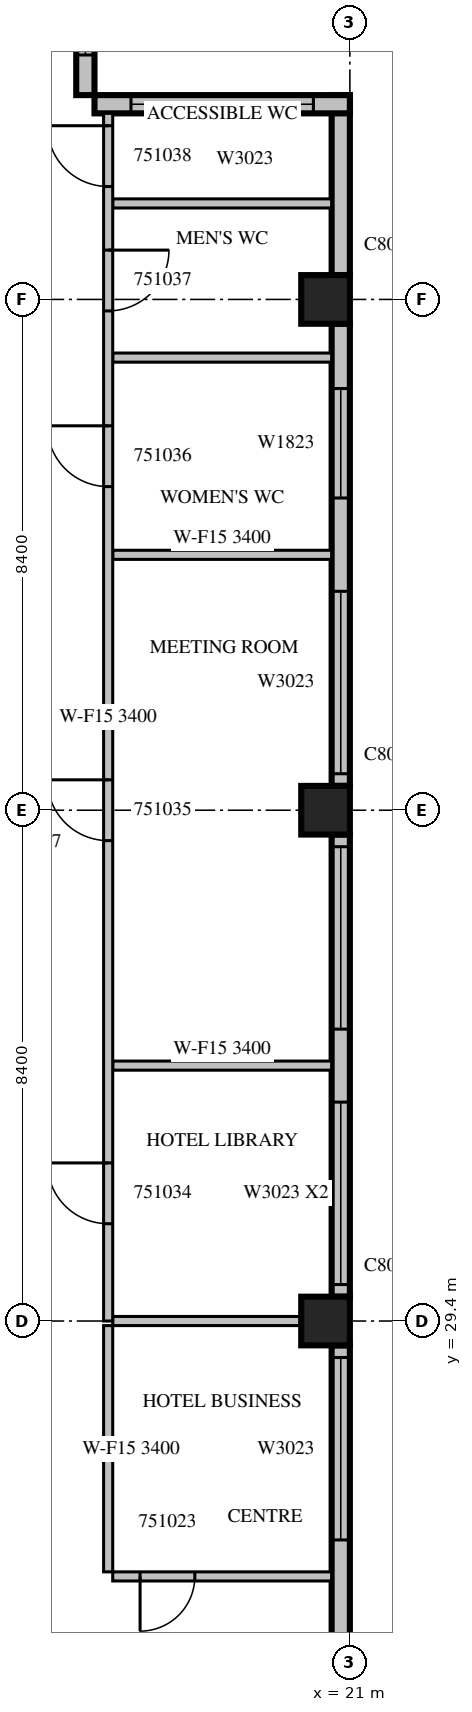
"""IFC4 building model, lengths in metres.
Left out: names, types, materials, properties, quantities, classifications, styles, units other than length and angle.
Written with IfcOpenShell. Run it as: python <this file> out.ifc"""

import sys

from ifc_helpers import new_model, si_unit, direction, frame, frame_2d, origin, origin_2d, place, context, subcontext, project, spatial, rectangle, extrude, source, transform, mapped, element, fill, save


model = new_model("IFC4")
c1 = context("Model", 3, precision=1e-05, world=origin(), true_north=direction((0.0, 1.0)))
c2 = subcontext(c1, "Body", "Model", "MODEL_VIEW")
j1 = project(units=[si_unit("LENGTHUNIT", "METRE"), si_unit("PLANEANGLEUNIT", "RADIAN")], contexts=[c1])
p1 = place(None, origin())
s1 = spatial("IfcSite", under=j1, at=p1, CompositionType="ELEMENT")
p2 = place(p1, origin())
s2 = spatial("IfcBuilding", under=s1, at=p2, CompositionType="ELEMENT")
p3 = place(p2, frame((0.0, 0.0, 227.2)))
s3 = spatial("IfcBuildingStorey", under=s2, at=p3, CompositionType="ELEMENT", Elevation=227.2)
m1 = source(origin(), c2, "Body", "SweptSolid", [
    extrude(rectangle(XDim=0.8, YDim=0.8, at=origin_2d()), origin(), (0.0, 0.0, 1.0), 3.8),
])
for number, where, z_axis, x_axis in (
    (1, (20.6, 29.4, 0.0), (0.0, 0.0, 1.0), (1.0, 0.0, 0.0)),
    (2, (20.6, 37.8, 0.0), (0.0, 0.0, 1.0), (1.0, 0.0, 0.0)),
    (3, (20.6, 46.2, 0.0), (0.0, 0.0, 1.0), (1.0, 0.0, 0.0)),
):
    element("IfcColumn", number, at=place(p3, frame(where, z_axis=z_axis, x_axis=x_axis)), inside=s3, PredefinedType="COLUMN", context=c2, shape_type="MappedRepresentation", body=[
        mapped(m1, transform((0.0, 0.0, 0.0), scale=1.0)),
    ])
m2 = source(origin(), c2, "Body", "SweptSolid", [
    extrude(rectangle(XDim=7.2, YDim=0.3, at=frame_2d((3.6, 0.0))), origin(), (0.0, 0.0, 1.0), 3.4),
])
p4 = place(p3, frame((20.85, 21.8, 0.0), z_axis=(0.0, 0.0, 1.0), x_axis=(0.0, 1.0, 0.0)))
e4 = element("IfcWall", 4, at=p4, inside=s3, PredefinedType="STANDARD", context=c2, shape_type="MappedRepresentation", body=[
    mapped(m2, transform((0.0, 0.0, 0.0), scale=1.0)),
])
m3 = source(origin(), c2, "Body", "SweptSolid", [
    extrude(rectangle(XDim=1.8, YDim=2.3, at=frame_2d((0.9, 1.15))), frame((0.0, 0.16, 0.0), z_axis=(0.0, -1.0, 0.0), x_axis=(1.0, 0.0, 0.0)), (0.0, 0.0, 1.0), 0.32),
])
p5 = place(p4, frame((0.4, 0.0, 0.6)))
e5 = element("IfcOpeningElement", 5, at=p5, cuts=e4, PredefinedType="OPENING", context=c2, shape_type="MappedRepresentation", body=[
    mapped(m3, transform((0.0, 0.0, 0.0), scale=1.0)),
])
m4 = source(origin(), c2, "Body", "SweptSolid", [
    extrude(rectangle(XDim=3.0, YDim=2.3, at=frame_2d((1.5, 1.15))), frame((0.0, 0.16, 0.0), z_axis=(0.0, -1.0, 0.0), x_axis=(1.0, 0.0, 0.0)), (0.0, 0.0, 1.0), 0.32),
])
p6 = place(p4, frame((4.0, 0.0, 0.6)))
e6 = element("IfcOpeningElement", 6, at=p6, cuts=e4, PredefinedType="OPENING", context=c2, shape_type="MappedRepresentation", body=[
    mapped(m4, transform((0.0, 0.0, 0.0), scale=1.0)),
])
m5 = source(origin(), c2, "Body", "SweptSolid", [
    extrude(rectangle(XDim=7.6, YDim=0.3, at=frame_2d((3.8, 0.0))), origin(), (0.0, 0.0, 1.0), 3.4),
])
p7 = place(p3, frame((20.85, 29.8, 0.0), z_axis=(0.0, 0.0, 1.0), x_axis=(0.0, 1.0, 0.0)))
e7 = element("IfcWall", 7, at=p7, inside=s3, PredefinedType="STANDARD", context=c2, shape_type="MappedRepresentation", body=[
    mapped(m5, transform((0.0, 0.0, 0.0), scale=1.0)),
])
p8 = place(p7, frame((0.2, 0.0, 0.6)))
e8 = element("IfcOpeningElement", 8, at=p8, cuts=e7, PredefinedType="OPENING", context=c2, shape_type="MappedRepresentation", body=[
    mapped(m4, transform((0.0, 0.0, 0.0), scale=1.0)),
])
p9 = place(p7, frame((4.4, 0.0, 0.6)))
e9 = element("IfcOpeningElement", 9, at=p9, cuts=e7, PredefinedType="OPENING", context=c2, shape_type="MappedRepresentation", body=[
    mapped(m4, transform((0.0, 0.0, 0.0), scale=1.0)),
])
p10 = place(p3, frame((20.85, 38.2, 0.0), z_axis=(0.0, 0.0, 1.0), x_axis=(0.0, 1.0, 0.0)))
e10 = element("IfcWall", 10, at=p10, inside=s3, PredefinedType="STANDARD", context=c2, shape_type="MappedRepresentation", body=[
    mapped(m5, transform((0.0, 0.0, 0.0), scale=1.0)),
])
p11 = place(p10, frame((0.2, 0.0, 0.6)))
e11 = element("IfcOpeningElement", 11, at=p11, cuts=e10, PredefinedType="OPENING", context=c2, shape_type="MappedRepresentation", body=[
    mapped(m4, transform((0.0, 0.0, 0.0), scale=1.0)),
])
p12 = place(p10, frame((4.734, 0.0, 0.6)))
e12 = element("IfcOpeningElement", 12, at=p12, cuts=e10, PredefinedType="OPENING", context=c2, shape_type="MappedRepresentation", body=[
    mapped(m3, transform((0.0, 0.0, 0.0), scale=1.0)),
])
m6 = source(origin(), c2, "Body", "SweptSolid", [
    extrude(rectangle(XDim=2.96, YDim=0.3, at=frame_2d((1.48, 0.0))), origin(), (0.0, 0.0, 1.0), 3.4),
])
p13 = place(p3, frame((20.85, 46.6, 0.0), z_axis=(0.0, 0.0, 1.0), x_axis=(0.0, 1.0, 0.0)))
e13 = element("IfcWall", 13, at=p13, inside=s3, PredefinedType="STANDARD", context=c2, shape_type="MappedRepresentation", body=[
    mapped(m6, transform((0.0, 0.0, 0.0), scale=1.0)),
])
m7 = source(origin(), c2, "Body", "SweptSolid", [
    extrude(rectangle(XDim=4.2, YDim=0.3, at=frame_2d((2.1, 0.0))), origin(), (0.0, 0.0, 1.0), 3.4),
])
p14 = place(p3, frame((21.0, 49.41, 0.0), z_axis=(0.0, 0.0, 1.0), x_axis=(-1.0, 0.0, 0.0)))
e14 = element("IfcWall", 14, at=p14, inside=s3, PredefinedType="STANDARD", context=c2, shape_type="MappedRepresentation", body=[
    mapped(m7, transform((0.0, 0.0, 0.0), scale=1.0)),
])
p15 = place(p14, frame((0.6, 0.0, 0.6)))
e15 = element("IfcOpeningElement", 15, at=p15, cuts=e14, PredefinedType="OPENING", context=c2, shape_type="MappedRepresentation", body=[
    mapped(m4, transform((0.0, 0.0, 0.0), scale=1.0)),
])
m8 = source(origin(), c2, "Body", "SweptSolid", [
    extrude(rectangle(XDim=2.52, YDim=0.3, at=frame_2d((1.26, 0.0))), origin(), (0.0, 0.0, 1.0), 3.4),
])
p16 = place(p3, frame((16.65, 49.56, 0.0), z_axis=(0.0, 0.0, 1.0), x_axis=(0.0, 1.0, 0.0)))
e16 = element("IfcWall", 16, at=p16, inside=s3, PredefinedType="STANDARD", context=c2, shape_type="MappedRepresentation", body=[
    mapped(m8, transform((0.0, 0.0, 0.0), scale=1.0)),
])
m9 = source(origin(), c2, "Body", "SweptSolid", [
    extrude(rectangle(XDim=1.2, YDim=2.3, at=frame_2d((0.6, 1.15))), frame((0.0, 0.16, 0.0), z_axis=(0.0, -1.0, 0.0), x_axis=(1.0, 0.0, 0.0)), (0.0, 0.0, 1.0), 0.32),
])
p17 = place(p16, frame((0.66, 0.0, 0.6)))
e17 = element("IfcOpeningElement", 17, at=p17, cuts=e16, PredefinedType="OPENING", context=c2, shape_type="MappedRepresentation", body=[
    mapped(m9, transform((0.0, 0.0, 0.0), scale=1.0)),
])
m10 = source(origin(), c2, "Body", "SweptSolid", [
    extrude(rectangle(XDim=3.6, YDim=0.15, at=frame_2d((1.8, 0.0))), origin(), (0.0, 0.0, 1.0), 3.4),
])
p18 = place(p3, frame((17.1, 25.2, 0.0), z_axis=(0.0, 0.0, 1.0), x_axis=(1.0, 0.0, 0.0)))
e18 = element("IfcWall", 18, at=p18, inside=s3, PredefinedType="PARTITIONING", context=c2, shape_type="MappedRepresentation", body=[
    mapped(m10, transform((0.0, 0.0, 0.0), scale=1.0)),
])
m11 = source(origin(), c2, "Body", "SweptSolid", [
    extrude(rectangle(XDim=0.9, YDim=2.1, at=frame_2d((0.45, 1.05))), frame((0.0, 0.085, 0.0), z_axis=(0.0, -1.0, 0.0), x_axis=(1.0, 0.0, 0.0)), (0.0, 0.0, 1.0), 0.17),
])
p19 = place(p18, frame((0.45, 0.0, 0.0)))
e19 = element("IfcOpeningElement", 19, at=p19, cuts=e18, PredefinedType="OPENING", context=c2, shape_type="MappedRepresentation", body=[
    mapped(m11, transform((0.0, 0.0, 0.0), scale=1.0)),
])
m12 = source(origin(), c2, "Body", "SweptSolid", [
    extrude(rectangle(XDim=4.05, YDim=0.15, at=frame_2d((2.025, 0.0))), origin(), (0.0, 0.0, 1.0), 3.4),
])
p20 = place(p3, frame((17.025, 29.325, 0.0), z_axis=(0.0, 0.0, 1.0), x_axis=(0.0, -1.0, 0.0)))
e20 = element("IfcWall", 20, at=p20, inside=s3, PredefinedType="PARTITIONING", context=c2, shape_type="MappedRepresentation", body=[
    mapped(m12, transform((0.0, 0.0, 0.0), scale=1.0)),
])
m13 = source(origin(), c2, "Body", "SweptSolid", [
    extrude(rectangle(XDim=3.101, YDim=0.15, at=frame_2d((1.55, 0.0))), origin(), (0.0, 0.0, 1.0), 3.4),
])
p21 = place(p3, frame((20.201, 29.4, 0.0), z_axis=(0.0, 0.0, 1.0), x_axis=(-1.0, 0.0, 0.0)))
e21 = element("IfcWall", 21, at=p21, inside=s3, PredefinedType="PARTITIONING", context=c2, shape_type="MappedRepresentation", body=[
    mapped(m13, transform((0.0, 0.0, 0.0), scale=1.0)),
])
for number, where, z_axis, x_axis in (
    (22, (17.1, 45.244, 0.0), (0.0, 0.0, 1.0), (1.0, 0.0, 0.0)),
    (23, (17.1, 47.779, 0.0), (0.0, 0.0, 1.0), (1.0, 0.0, 0.0)),
    (24, (20.7, 33.6, 0.0), (0.0, 0.0, 1.0), (-1.0, 0.0, 0.0)),
    (25, (20.7, 42.0, 0.0), (0.0, 0.0, 1.0), (-1.0, 0.0, 0.0)),
):
    element("IfcWall", number, at=place(p3, frame(where, z_axis=z_axis, x_axis=x_axis)), inside=s3, PredefinedType="PARTITIONING", context=c2, shape_type="MappedRepresentation", body=[
        mapped(m10, transform((0.0, 0.0, 0.0), scale=1.0)),
    ])
m14 = source(origin(), c2, "Body", "SweptSolid", [
    extrude(rectangle(XDim=19.86, YDim=0.15, at=frame_2d((9.93, 0.0))), origin(), (0.0, 0.0, 1.0), 3.4),
])
p22 = place(p3, frame((17.025, 49.26, 0.0), z_axis=(0.0, 0.0, 1.0), x_axis=(0.0, -1.0, 0.0)))
e26 = element("IfcWall", 26, at=p22, inside=s3, PredefinedType="PARTITIONING", context=c2, shape_type="MappedRepresentation", body=[
    mapped(m14, transform((0.0, 0.0, 0.0), scale=1.0)),
])
m15 = source(origin(), c2, "Body", "SweptSolid", [
    extrude(rectangle(XDim=1.0, YDim=2.1, at=frame_2d((0.5, 1.05))), frame((0.0, 0.085, 0.0), z_axis=(0.0, -1.0, 0.0), x_axis=(1.0, 0.0, 0.0)), (0.0, 0.0, 1.0), 0.17),
])
p23 = place(p22, frame((17.26, 0.0, 0.0)))
e27 = element("IfcOpeningElement", 27, at=p23, cuts=e26, PredefinedType="OPENING", context=c2, shape_type="MappedRepresentation", body=[
    mapped(m15, transform((0.0, 0.0, 0.0), scale=1.0)),
])
p24 = place(p22, frame((10.96, 0.0, 0.0)))
e28 = element("IfcOpeningElement", 28, at=p24, cuts=e26, PredefinedType="OPENING", context=c2, shape_type="MappedRepresentation", body=[
    mapped(m15, transform((0.0, 0.0, 0.0), scale=1.0)),
])
p25 = place(p22, frame((5.138, 0.0, 0.0)))
e29 = element("IfcOpeningElement", 29, at=p25, cuts=e26, PredefinedType="OPENING", context=c2, shape_type="MappedRepresentation", body=[
    mapped(m15, transform((0.0, 0.0, 0.0), scale=1.0)),
])
p26 = place(p22, frame((2.249, 0.0, 0.0)))
e30 = element("IfcOpeningElement", 30, at=p26, cuts=e26, PredefinedType="OPENING", context=c2, shape_type="MappedRepresentation", body=[
    mapped(m15, transform((0.0, 0.0, 0.0), scale=1.0)),
])
p27 = place(p22, frame((0.203, 0.0, 0.0)))
e31 = element("IfcOpeningElement", 31, at=p27, cuts=e26, PredefinedType="OPENING", context=c2, shape_type="MappedRepresentation", body=[
    mapped(m15, transform((0.0, 0.0, 0.0), scale=1.0)),
])
m16 = source(origin(), c2, "Body", "SweptSolid", [
    extrude(rectangle(XDim=3.0, YDim=2.3, at=frame_2d((1.5, 1.15))), frame((0.0, 0.03, 0.0), z_axis=(0.0, -1.0, 0.0), x_axis=(1.0, 0.0, 0.0)), (0.0, 0.0, 1.0), 0.06),
])
p28 = place(p6, origin())
e32 = element("IfcWindow", 32, at=p28, inside=s3, PartitioningType="SINGLE_PANEL", PredefinedType="WINDOW", context=c2, shape_type="MappedRepresentation", body=[
    mapped(m16, transform((0.0, 0.0, 0.0), scale=1.0)),
])
fill(e6, e32)
p29 = place(p8, origin())
e33 = element("IfcWindow", 33, at=p29, inside=s3, PartitioningType="SINGLE_PANEL", PredefinedType="WINDOW", context=c2, shape_type="MappedRepresentation", body=[
    mapped(m16, transform((0.0, 0.0, 0.0), scale=1.0)),
])
fill(e8, e33)
p30 = place(p9, origin())
e34 = element("IfcWindow", 34, at=p30, inside=s3, PartitioningType="SINGLE_PANEL", PredefinedType="WINDOW", context=c2, shape_type="MappedRepresentation", body=[
    mapped(m16, transform((0.0, 0.0, 0.0), scale=1.0)),
])
fill(e9, e34)
p31 = place(p11, origin())
e35 = element("IfcWindow", 35, at=p31, inside=s3, PartitioningType="SINGLE_PANEL", PredefinedType="WINDOW", context=c2, shape_type="MappedRepresentation", body=[
    mapped(m16, transform((0.0, 0.0, 0.0), scale=1.0)),
])
fill(e11, e35)
m17 = source(origin(), c2, "Body", "SweptSolid", [
    extrude(rectangle(XDim=1.8, YDim=2.3, at=frame_2d((0.9, 1.15))), frame((0.0, 0.03, 0.0), z_axis=(0.0, -1.0, 0.0), x_axis=(1.0, 0.0, 0.0)), (0.0, 0.0, 1.0), 0.06),
])
p32 = place(p12, origin())
e36 = element("IfcWindow", 36, at=p32, inside=s3, PartitioningType="SINGLE_PANEL", PredefinedType="WINDOW", context=c2, shape_type="MappedRepresentation", body=[
    mapped(m17, transform((0.0, 0.0, 0.0), scale=1.0)),
])
fill(e12, e36)
p33 = place(p15, origin())
e37 = element("IfcWindow", 37, at=p33, inside=s3, PartitioningType="SINGLE_PANEL", PredefinedType="WINDOW", context=c2, shape_type="MappedRepresentation", body=[
    mapped(m16, transform((0.0, 0.0, 0.0), scale=1.0)),
])
fill(e15, e37)
m18 = source(origin(), c2, "Body", "SweptSolid", [
    extrude(rectangle(XDim=1.2, YDim=2.3, at=frame_2d((0.6, 1.15))), frame((0.0, 0.03, 0.0), z_axis=(0.0, -1.0, 0.0), x_axis=(1.0, 0.0, 0.0)), (0.0, 0.0, 1.0), 0.06),
])
p34 = place(p17, origin())
e38 = element("IfcWindow", 38, at=p34, inside=s3, PartitioningType="SINGLE_PANEL", PredefinedType="WINDOW", context=c2, shape_type="MappedRepresentation", body=[
    mapped(m18, transform((0.0, 0.0, 0.0), scale=1.0)),
])
fill(e17, e38)
m19 = source(origin(), c2, "Body", "SweptSolid", [
    extrude(rectangle(XDim=0.9, YDim=2.1, at=frame_2d((0.45, 1.05))), frame((0.0, 0.025, 0.0), z_axis=(0.0, -1.0, 0.0), x_axis=(1.0, 0.0, 0.0)), (0.0, 0.0, 1.0), 0.05),
])
p35 = place(p19, origin())
e39 = element("IfcDoor", 39, at=p35, inside=s3, OperationType="SINGLE_SWING_RIGHT", PredefinedType="DOOR", context=c2, shape_type="MappedRepresentation", body=[
    mapped(m19, transform((0.0, 0.0, 0.0), scale=1.0)),
])
fill(e19, e39)
m20 = source(origin(), c2, "Body", "SweptSolid", [
    extrude(rectangle(XDim=1.0, YDim=2.1, at=frame_2d((0.5, 1.05))), frame((0.0, 0.025, 0.0), z_axis=(0.0, -1.0, 0.0), x_axis=(1.0, 0.0, 0.0)), (0.0, 0.0, 1.0), 0.05),
])
p36 = place(p23, origin())
e40 = element("IfcDoor", 40, at=p36, inside=s3, OperationType="SINGLE_SWING_RIGHT", PredefinedType="DOOR", context=c2, shape_type="MappedRepresentation", body=[
    mapped(m20, transform((0.0, 0.0, 0.0), scale=1.0)),
])
fill(e27, e40)
p37 = place(p24, origin())
e41 = element("IfcDoor", 41, at=p37, inside=s3, OperationType="SINGLE_SWING_RIGHT", PredefinedType="DOOR", context=c2, shape_type="MappedRepresentation", body=[
    mapped(m20, transform((0.0, 0.0, 0.0), scale=1.0)),
])
fill(e28, e41)
p38 = place(p25, origin())
e42 = element("IfcDoor", 42, at=p38, inside=s3, OperationType="SINGLE_SWING_RIGHT", PredefinedType="DOOR", context=c2, shape_type="MappedRepresentation", body=[
    mapped(m20, transform((0.0, 0.0, 0.0), scale=1.0)),
])
fill(e29, e42)
p39 = place(p26, origin())
e43 = element("IfcDoor", 43, at=p39, inside=s3, OperationType="SINGLE_SWING_LEFT", PredefinedType="DOOR", context=c2, shape_type="MappedRepresentation", body=[
    mapped(m20, transform((0.0, 0.0, 0.0), scale=1.0)),
])
fill(e30, e43)
p40 = place(p27, origin())
e44 = element("IfcDoor", 44, at=p40, inside=s3, OperationType="SINGLE_SWING_RIGHT", PredefinedType="DOOR", context=c2, shape_type="MappedRepresentation", body=[
    mapped(m20, transform((0.0, 0.0, 0.0), scale=1.0)),
])
fill(e31, e44)
save(model, sys.argv[1])
